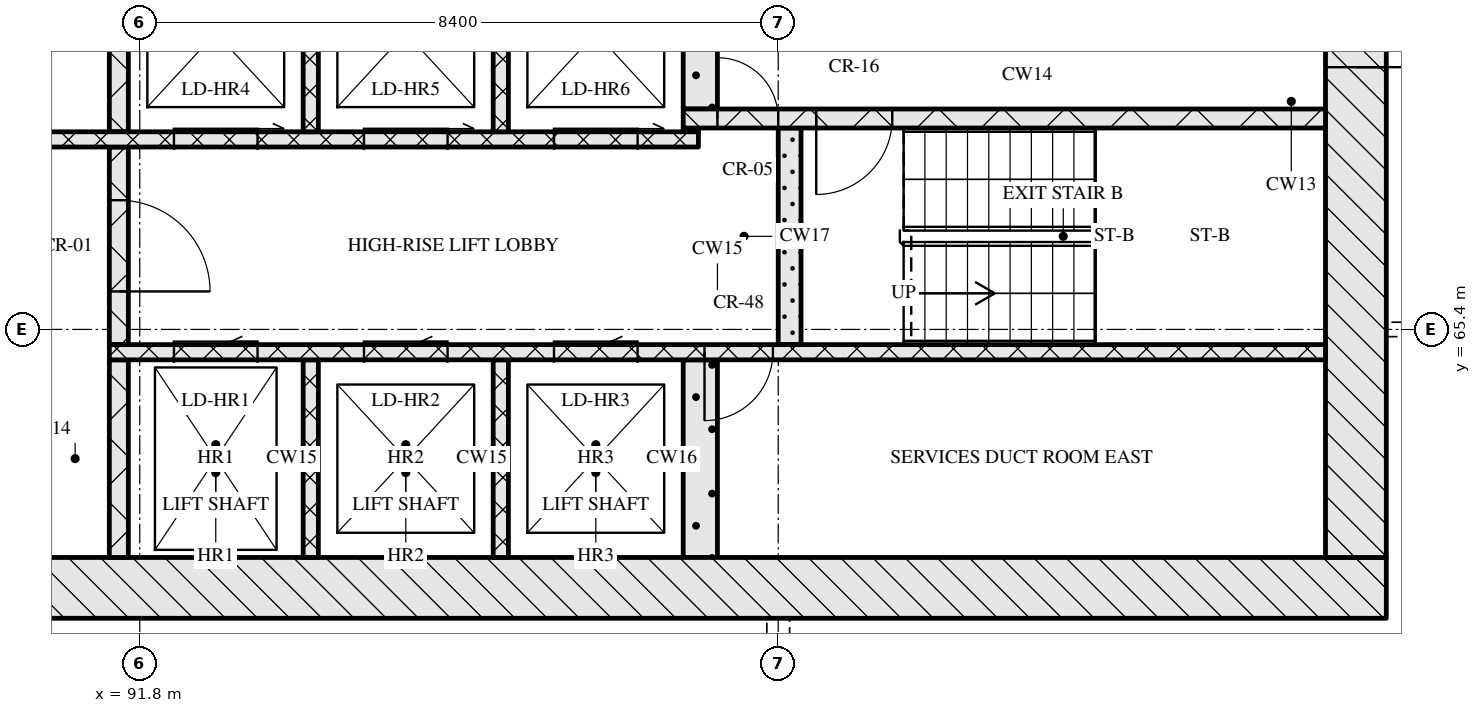
"""IFC4 building model, lengths in metres.
Left out: names, types, materials, properties, quantities, classifications, styles, units other than length and angle.
Written with IfcOpenShell. Run it as: python <this file> out.ifc"""

import sys

from ifc_helpers import new_model, si_unit, direction, frame, frame_2d, origin, place, context, subcontext, project, spatial, rectangle, extrude, element, fill, save


model = new_model("IFC4")
c1 = context("Model", 3, precision=1e-05, world=origin(), true_north=direction((0.0, 1.0)))
c2 = subcontext(c1, "Body", "Model", "MODEL_VIEW")
j1 = project(units=[si_unit("LENGTHUNIT", "METRE"), si_unit("PLANEANGLEUNIT", "RADIAN")], contexts=[c1])
p1 = place(None, origin())
s1 = spatial("IfcSite", under=j1, at=p1, CompositionType="ELEMENT")
p2 = place(p1, origin())
s2 = spatial("IfcBuilding", under=s1, at=p2, CompositionType="ELEMENT")
p3 = place(p2, frame((0.0, 0.0, 183.45)))
s3 = spatial("IfcBuildingStorey", under=s2, at=p3, CompositionType="ELEMENT", Elevation=183.45)
p4 = place(p3, frame((67.0, 62.0, 0.0), z_axis=(0.0, 0.0, 1.0), x_axis=(1.0, 0.0, 0.0)))
e1 = element("IfcWall", 1, at=p4, inside=s3, PredefinedType="SOLIDWALL", context=c2, shape_type="SweptSolid", body=[
    extrude(rectangle(XDim=41.2, YDim=0.8, at=frame_2d((20.6, 0.0))), origin(), (0.0, 0.0, 1.0), 3.32),
])
p5 = place(p4, frame((20.95, 0.0, 0.0)))
e2 = element("IfcOpeningElement", 2, at=p5, cuts=e1, PredefinedType="OPENING", context=c2, shape_type="SweptSolid", body=[
    extrude(rectangle(XDim=1.8, YDim=2.1, at=frame_2d((0.9, 1.05))), frame((0.0, 0.41, 0.0), z_axis=(0.0, -1.0, 0.0), x_axis=(1.0, 0.0, 0.0)), (0.0, 0.0, 1.0), 0.82),
])
p6 = place(p3, frame((107.8, 62.4, 0.0), z_axis=(0.0, 0.0, 1.0), x_axis=(0.0, 1.0, 0.0)))
e3 = element("IfcWall", 3, at=p6, inside=s3, PredefinedType="SOLIDWALL", context=c2, shape_type="SweptSolid", body=[
    extrude(rectangle(XDim=12.0, YDim=0.8, at=frame_2d((6.0, 0.0))), origin(), (0.0, 0.0, 1.0), 3.32),
])
p7 = place(p6, frame((6.45, 0.0, 0.0)))
e4 = element("IfcOpeningElement", 4, at=p7, cuts=e3, PredefinedType="OPENING", context=c2, shape_type="SweptSolid", body=[
    extrude(rectangle(XDim=1.2, YDim=2.1, at=frame_2d((0.6, 1.05))), frame((0.0, 0.41, 0.0), z_axis=(0.0, -1.0, 0.0), x_axis=(1.0, 0.0, 0.0)), (0.0, 0.0, 1.0), 0.82),
])
p8 = place(p3, frame((91.525, 62.4, 0.0), z_axis=(0.0, 0.0, 1.0), x_axis=(0.0, 1.0, 0.0)))
e5 = element("IfcWall", 5, at=p8, inside=s3, PredefinedType="SOLIDWALL", context=c2, shape_type="SweptSolid", body=[
    extrude(rectangle(XDim=2.6, YDim=0.25, at=frame_2d((1.3, 0.0))), origin(), (0.0, 0.0, 1.0), 3.32),
])
for number, where, z_axis, x_axis in (
    (6, (94.05, 62.4, 0.0), (0.0, 0.0, 1.0), (0.0, 1.0, 0.0)),
    (7, (96.55, 62.4, 0.0), (0.0, 0.0, 1.0), (0.0, 1.0, 0.0)),
):
    element("IfcWall", number, at=place(p3, frame(where, z_axis=z_axis, x_axis=x_axis)), inside=s3, PredefinedType="SOLIDWALL", context=c2, shape_type="SweptSolid", body=[
        extrude(rectangle(XDim=2.6, YDim=0.2, at=frame_2d((1.3, 0.0))), origin(), (0.0, 0.0, 1.0), 3.32),
    ])
p9 = place(p3, frame((99.175, 62.4, 0.0), z_axis=(0.0, 0.0, 1.0), x_axis=(0.0, 1.0, 0.0)))
e8 = element("IfcWall", 8, at=p9, inside=s3, PredefinedType="SOLIDWALL", context=c2, shape_type="SweptSolid", body=[
    extrude(rectangle(XDim=2.6, YDim=0.45, at=frame_2d((1.3, 0.0))), origin(), (0.0, 0.0, 1.0), 3.32),
])
p10 = place(p3, frame((91.4, 65.1, 0.0), z_axis=(0.0, 0.0, 1.0), x_axis=(1.0, 0.0, 0.0)))
e9 = element("IfcWall", 9, at=p10, inside=s3, PredefinedType="SOLIDWALL", context=c2, shape_type="SweptSolid", body=[
    extrude(rectangle(XDim=16.0, YDim=0.2, at=frame_2d((8.0, 0.0))), origin(), (0.0, 0.0, 1.0), 3.32),
])
p11 = place(p10, frame((0.85, 0.0, 0.0)))
e10 = element("IfcOpeningElement", 10, at=p11, cuts=e9, PredefinedType="OPENING", context=c2, shape_type="SweptSolid", body=[
    extrude(rectangle(XDim=1.1, YDim=2.1, at=frame_2d((0.55, 1.05))), frame((0.0, 0.11, 0.0), z_axis=(0.0, -1.0, 0.0), x_axis=(1.0, 0.0, 0.0)), (0.0, 0.0, 1.0), 0.22),
])
p12 = place(p10, frame((3.35, 0.0, 0.0)))
e11 = element("IfcOpeningElement", 11, at=p12, cuts=e9, PredefinedType="OPENING", context=c2, shape_type="SweptSolid", body=[
    extrude(rectangle(XDim=1.1, YDim=2.1, at=frame_2d((0.55, 1.05))), frame((0.0, 0.11, 0.0), z_axis=(0.0, -1.0, 0.0), x_axis=(1.0, 0.0, 0.0)), (0.0, 0.0, 1.0), 0.22),
])
p13 = place(p10, frame((5.85, 0.0, 0.0)))
e12 = element("IfcOpeningElement", 12, at=p13, cuts=e9, PredefinedType="OPENING", context=c2, shape_type="SweptSolid", body=[
    extrude(rectangle(XDim=1.1, YDim=2.1, at=frame_2d((0.55, 1.05))), frame((0.0, 0.11, 0.0), z_axis=(0.0, -1.0, 0.0), x_axis=(1.0, 0.0, 0.0)), (0.0, 0.0, 1.0), 0.22),
])
p14 = place(p10, frame((7.83, 0.0, 0.0)))
e13 = element("IfcOpeningElement", 13, at=p14, cuts=e9, PredefinedType="OPENING", context=c2, shape_type="SweptSolid", body=[
    extrude(rectangle(XDim=0.9, YDim=2.1, at=frame_2d((0.45, 1.05))), frame((0.0, 0.11, 0.0), z_axis=(0.0, -1.0, 0.0), x_axis=(1.0, 0.0, 0.0)), (0.0, 0.0, 1.0), 0.22),
])
p15 = place(p3, frame((91.525, 65.2, 0.0), z_axis=(0.0, 0.0, 1.0), x_axis=(0.0, 1.0, 0.0)))
e14 = element("IfcWall", 14, at=p15, inside=s3, PredefinedType="SOLIDWALL", context=c2, shape_type="SweptSolid", body=[
    extrude(rectangle(XDim=2.6, YDim=0.25, at=frame_2d((1.3, 0.0))), origin(), (0.0, 0.0, 1.0), 3.32),
])
p16 = place(p15, frame((0.7, 0.0, 0.0)))
e15 = element("IfcOpeningElement", 15, at=p16, cuts=e14, PredefinedType="OPENING", context=c2, shape_type="SweptSolid", body=[
    extrude(rectangle(XDim=1.2, YDim=2.1, at=frame_2d((0.6, 1.05))), frame((0.0, 0.135, 0.0), z_axis=(0.0, -1.0, 0.0), x_axis=(1.0, 0.0, 0.0)), (0.0, 0.0, 1.0), 0.27),
])
p17 = place(p3, frame((100.35, 65.2, 0.0), z_axis=(0.0, 0.0, 1.0), x_axis=(0.0, 1.0, 0.0)))
e16 = element("IfcWall", 16, at=p17, inside=s3, PredefinedType="SOLIDWALL", context=c2, shape_type="SweptSolid", body=[
    extrude(rectangle(XDim=2.85, YDim=0.3, at=frame_2d((1.425, 0.0))), origin(), (0.0, 0.0, 1.0), 3.32),
])
p18 = place(p3, frame((76.05, 67.9, 0.0), z_axis=(0.0, 0.0, 1.0), x_axis=(1.0, 0.0, 0.0)))
e17 = element("IfcWall", 17, at=p18, inside=s3, PredefinedType="SOLIDWALL", context=c2, shape_type="SweptSolid", body=[
    extrude(rectangle(XDim=23.1, YDim=0.2, at=frame_2d((11.55, 0.0))), origin(), (0.0, 0.0, 1.0), 3.32),
])
p19 = place(p18, frame((0.75, 0.0, 0.0)))
e18 = element("IfcOpeningElement", 18, at=p19, cuts=e17, PredefinedType="OPENING", context=c2, shape_type="SweptSolid", body=[
    extrude(rectangle(XDim=0.9, YDim=2.1, at=frame_2d((0.45, 1.05))), frame((0.0, 0.11, 0.0), z_axis=(0.0, -1.0, 0.0), x_axis=(1.0, 0.0, 0.0)), (0.0, 0.0, 1.0), 0.22),
])
p20 = place(p18, frame((3.32, 0.0, 0.0)))
e19 = element("IfcOpeningElement", 19, at=p20, cuts=e17, PredefinedType="OPENING", context=c2, shape_type="SweptSolid", body=[
    extrude(rectangle(XDim=0.9, YDim=2.1, at=frame_2d((0.45, 1.05))), frame((0.0, 0.11, 0.0), z_axis=(0.0, -1.0, 0.0), x_axis=(1.0, 0.0, 0.0)), (0.0, 0.0, 1.0), 0.22),
])
p21 = place(p18, frame((5.77, 0.0, 0.0)))
e20 = element("IfcOpeningElement", 20, at=p21, cuts=e17, PredefinedType="OPENING", context=c2, shape_type="SweptSolid", body=[
    extrude(rectangle(XDim=0.9, YDim=2.1, at=frame_2d((0.45, 1.05))), frame((0.0, 0.11, 0.0), z_axis=(0.0, -1.0, 0.0), x_axis=(1.0, 0.0, 0.0)), (0.0, 0.0, 1.0), 0.22),
])
p22 = place(p18, frame((8.45, 0.0, 0.0)))
e21 = element("IfcOpeningElement", 21, at=p22, cuts=e17, PredefinedType="OPENING", context=c2, shape_type="SweptSolid", body=[
    extrude(rectangle(XDim=0.9, YDim=2.1, at=frame_2d((0.45, 1.05))), frame((0.0, 0.11, 0.0), z_axis=(0.0, -1.0, 0.0), x_axis=(1.0, 0.0, 0.0)), (0.0, 0.0, 1.0), 0.22),
])
p23 = place(p18, frame((10.91, 0.0, 0.0)))
e22 = element("IfcOpeningElement", 22, at=p23, cuts=e17, PredefinedType="OPENING", context=c2, shape_type="SweptSolid", body=[
    extrude(rectangle(XDim=0.9, YDim=2.1, at=frame_2d((0.45, 1.05))), frame((0.0, 0.11, 0.0), z_axis=(0.0, -1.0, 0.0), x_axis=(1.0, 0.0, 0.0)), (0.0, 0.0, 1.0), 0.22),
])
p24 = place(p18, frame((13.55, 0.0, 0.0)))
e23 = element("IfcOpeningElement", 23, at=p24, cuts=e17, PredefinedType="OPENING", context=c2, shape_type="SweptSolid", body=[
    extrude(rectangle(XDim=1.0, YDim=2.1, at=frame_2d((0.5, 1.05))), frame((0.0, 0.11, 0.0), z_axis=(0.0, -1.0, 0.0), x_axis=(1.0, 0.0, 0.0)), (0.0, 0.0, 1.0), 0.22),
])
p25 = place(p18, frame((16.2, 0.0, 0.0)))
e24 = element("IfcOpeningElement", 24, at=p25, cuts=e17, PredefinedType="OPENING", context=c2, shape_type="SweptSolid", body=[
    extrude(rectangle(XDim=1.1, YDim=2.1, at=frame_2d((0.55, 1.05))), frame((0.0, 0.11, 0.0), z_axis=(0.0, -1.0, 0.0), x_axis=(1.0, 0.0, 0.0)), (0.0, 0.0, 1.0), 0.22),
])
p26 = place(p18, frame((18.7, 0.0, 0.0)))
e25 = element("IfcOpeningElement", 25, at=p26, cuts=e17, PredefinedType="OPENING", context=c2, shape_type="SweptSolid", body=[
    extrude(rectangle(XDim=1.1, YDim=2.1, at=frame_2d((0.55, 1.05))), frame((0.0, 0.11, 0.0), z_axis=(0.0, -1.0, 0.0), x_axis=(1.0, 0.0, 0.0)), (0.0, 0.0, 1.0), 0.22),
])
p27 = place(p18, frame((21.2, 0.0, 0.0)))
e26 = element("IfcOpeningElement", 26, at=p27, cuts=e17, PredefinedType="OPENING", context=c2, shape_type="SweptSolid", body=[
    extrude(rectangle(XDim=1.1, YDim=2.1, at=frame_2d((0.55, 1.05))), frame((0.0, 0.11, 0.0), z_axis=(0.0, -1.0, 0.0), x_axis=(1.0, 0.0, 0.0)), (0.0, 0.0, 1.0), 0.22),
])
p28 = place(p3, frame((91.525, 68.0, 0.0), z_axis=(0.0, 0.0, 1.0), x_axis=(0.0, 1.0, 0.0)))
e27 = element("IfcWall", 27, at=p28, inside=s3, PredefinedType="SOLIDWALL", context=c2, shape_type="SweptSolid", body=[
    extrude(rectangle(XDim=2.6, YDim=0.25, at=frame_2d((1.3, 0.0))), origin(), (0.0, 0.0, 1.0), 3.32),
])
for number, where, z_axis, x_axis in (
    (28, (94.05, 68.0, 0.0), (0.0, 0.0, 1.0), (0.0, 1.0, 0.0)),
    (29, (96.55, 68.0, 0.0), (0.0, 0.0, 1.0), (0.0, 1.0, 0.0)),
):
    element("IfcWall", number, at=place(p3, frame(where, z_axis=z_axis, x_axis=x_axis)), inside=s3, PredefinedType="SOLIDWALL", context=c2, shape_type="SweptSolid", body=[
        extrude(rectangle(XDim=2.6, YDim=0.2, at=frame_2d((1.3, 0.0))), origin(), (0.0, 0.0, 1.0), 3.32),
    ])
p29 = place(p3, frame((98.95, 68.025, 0.0), z_axis=(0.0, 0.0, 1.0), x_axis=(1.0, 0.0, 0.0)))
e30 = element("IfcWall", 30, at=p29, inside=s3, PredefinedType="SOLIDWALL", context=c2, shape_type="SweptSolid", body=[
    extrude(rectangle(XDim=0.2, YDim=0.05, at=frame_2d((0.1, 0.0))), origin(), (0.0, 0.0, 1.0), 3.32),
])
p30 = place(p3, frame((98.95, 68.175, 0.0), z_axis=(0.0, 0.0, 1.0), x_axis=(1.0, 0.0, 0.0)))
e31 = element("IfcWall", 31, at=p30, inside=s3, PredefinedType="SOLIDWALL", context=c2, shape_type="SweptSolid", body=[
    extrude(rectangle(XDim=8.45, YDim=0.25, at=frame_2d((4.225, 0.0))), origin(), (0.0, 0.0, 1.0), 3.32),
])
p31 = place(p30, frame((0.45, 0.0, 0.0)))
e32 = element("IfcOpeningElement", 32, at=p31, cuts=e31, PredefinedType="OPENING", context=c2, shape_type="SweptSolid", body=[
    extrude(rectangle(XDim=0.8, YDim=2.1, at=frame_2d((0.4, 1.05))), frame((0.0, 0.135, 0.0), z_axis=(0.0, -1.0, 0.0), x_axis=(1.0, 0.0, 0.0)), (0.0, 0.0, 1.0), 0.27),
])
p32 = place(p30, frame((1.75, 0.0, 0.0)))
e33 = element("IfcOpeningElement", 33, at=p32, cuts=e31, PredefinedType="OPENING", context=c2, shape_type="SweptSolid", body=[
    extrude(rectangle(XDim=1.0, YDim=2.1, at=frame_2d((0.5, 1.05))), frame((0.0, 0.135, 0.0), z_axis=(0.0, -1.0, 0.0), x_axis=(1.0, 0.0, 0.0)), (0.0, 0.0, 1.0), 0.27),
])
p33 = place(p3, frame((99.175, 68.3, 0.0), z_axis=(0.0, 0.0, 1.0), x_axis=(0.0, 1.0, 0.0)))
e34 = element("IfcWall", 34, at=p33, inside=s3, PredefinedType="SOLIDWALL", context=c2, shape_type="SweptSolid", body=[
    extrude(rectangle(XDim=2.3, YDim=0.45, at=frame_2d((1.15, 0.0))), origin(), (0.0, 0.0, 1.0), 3.32),
])
p34 = place(p11, origin())
e35 = element("IfcDoor", 35, at=p34, inside=s3, OperationType="SLIDING_TO_LEFT", PredefinedType="DOOR", context=c2, shape_type="SweptSolid", body=[
    extrude(rectangle(XDim=1.1, YDim=2.1, at=frame_2d((0.55, 1.05))), frame((0.0, 0.025, 0.0), z_axis=(0.0, -1.0, 0.0), x_axis=(1.0, 0.0, 0.0)), (0.0, 0.0, 1.0), 0.05),
])
fill(e10, e35)
p35 = place(p12, origin())
e36 = element("IfcDoor", 36, at=p35, inside=s3, OperationType="SLIDING_TO_LEFT", PredefinedType="DOOR", context=c2, shape_type="SweptSolid", body=[
    extrude(rectangle(XDim=1.1, YDim=2.1, at=frame_2d((0.55, 1.05))), frame((0.0, 0.025, 0.0), z_axis=(0.0, -1.0, 0.0), x_axis=(1.0, 0.0, 0.0)), (0.0, 0.0, 1.0), 0.05),
])
fill(e11, e36)
p36 = place(p13, origin())
e37 = element("IfcDoor", 37, at=p36, inside=s3, OperationType="SLIDING_TO_LEFT", PredefinedType="DOOR", context=c2, shape_type="SweptSolid", body=[
    extrude(rectangle(XDim=1.1, YDim=2.1, at=frame_2d((0.55, 1.05))), frame((0.0, 0.025, 0.0), z_axis=(0.0, -1.0, 0.0), x_axis=(1.0, 0.0, 0.0)), (0.0, 0.0, 1.0), 0.05),
])
fill(e12, e37)
p37 = place(p14, origin())
e38 = element("IfcDoor", 38, at=p37, inside=s3, OperationType="SINGLE_SWING_RIGHT", PredefinedType="DOOR", context=c2, shape_type="SweptSolid", body=[
    extrude(rectangle(XDim=0.9, YDim=2.1, at=frame_2d((0.45, 1.05))), frame((0.0, 0.025, 0.0), z_axis=(0.0, -1.0, 0.0), x_axis=(1.0, 0.0, 0.0)), (0.0, 0.0, 1.0), 0.05),
])
fill(e13, e38)
p38 = place(p16, origin())
e39 = element("IfcDoor", 39, at=p38, inside=s3, OperationType="SINGLE_SWING_RIGHT", PredefinedType="DOOR", context=c2, shape_type="SweptSolid", body=[
    extrude(rectangle(XDim=1.2, YDim=2.1, at=frame_2d((0.6, 1.05))), frame((0.0, 0.025, 0.0), z_axis=(0.0, -1.0, 0.0), x_axis=(1.0, 0.0, 0.0)), (0.0, 0.0, 1.0), 0.05),
])
fill(e15, e39)
p39 = place(p25, origin())
e40 = element("IfcDoor", 40, at=p39, inside=s3, OperationType="SLIDING_TO_RIGHT", PredefinedType="DOOR", context=c2, shape_type="SweptSolid", body=[
    extrude(rectangle(XDim=1.1, YDim=2.1, at=frame_2d((0.55, 1.05))), frame((0.0, 0.025, 0.0), z_axis=(0.0, -1.0, 0.0), x_axis=(1.0, 0.0, 0.0)), (0.0, 0.0, 1.0), 0.05),
])
fill(e24, e40)
p40 = place(p26, origin())
e41 = element("IfcDoor", 41, at=p40, inside=s3, OperationType="SLIDING_TO_RIGHT", PredefinedType="DOOR", context=c2, shape_type="SweptSolid", body=[
    extrude(rectangle(XDim=1.1, YDim=2.1, at=frame_2d((0.55, 1.05))), frame((0.0, 0.025, 0.0), z_axis=(0.0, -1.0, 0.0), x_axis=(1.0, 0.0, 0.0)), (0.0, 0.0, 1.0), 0.05),
])
fill(e25, e41)
p41 = place(p27, origin())
e42 = element("IfcDoor", 42, at=p41, inside=s3, OperationType="SLIDING_TO_RIGHT", PredefinedType="DOOR", context=c2, shape_type="SweptSolid", body=[
    extrude(rectangle(XDim=1.1, YDim=2.1, at=frame_2d((0.55, 1.05))), frame((0.0, 0.025, 0.0), z_axis=(0.0, -1.0, 0.0), x_axis=(1.0, 0.0, 0.0)), (0.0, 0.0, 1.0), 0.05),
])
fill(e26, e42)
p42 = place(p31, origin())
e43 = element("IfcDoor", 43, at=p42, inside=s3, OperationType="SINGLE_SWING_LEFT", PredefinedType="DOOR", context=c2, shape_type="SweptSolid", body=[
    extrude(rectangle(XDim=0.8, YDim=2.1, at=frame_2d((0.4, 1.05))), frame((0.0, 0.025, 0.0), z_axis=(0.0, -1.0, 0.0), x_axis=(1.0, 0.0, 0.0)), (0.0, 0.0, 1.0), 0.05),
])
fill(e32, e43)
p43 = place(p32, origin())
e44 = element("IfcDoor", 44, at=p43, inside=s3, OperationType="SINGLE_SWING_RIGHT", PredefinedType="DOOR", context=c2, shape_type="SweptSolid", body=[
    extrude(rectangle(XDim=1.0, YDim=2.1, at=frame_2d((0.5, 1.05))), frame((0.0, 0.025, 0.0), z_axis=(0.0, -1.0, 0.0), x_axis=(1.0, 0.0, 0.0)), (0.0, 0.0, 1.0), 0.05),
])
fill(e33, e44)
p44 = place(p7, origin())
e45 = element("IfcDoor", 45, at=p44, inside=s3, OperationType="SINGLE_SWING_RIGHT", PredefinedType="DOOR", context=c2, shape_type="SweptSolid", body=[
    extrude(rectangle(XDim=1.2, YDim=2.1, at=frame_2d((0.6, 1.05))), frame((0.0, 0.025, 0.0), z_axis=(0.0, -1.0, 0.0), x_axis=(1.0, 0.0, 0.0)), (0.0, 0.0, 1.0), 0.05),
])
fill(e4, e45)
save(model, sys.argv[1])
